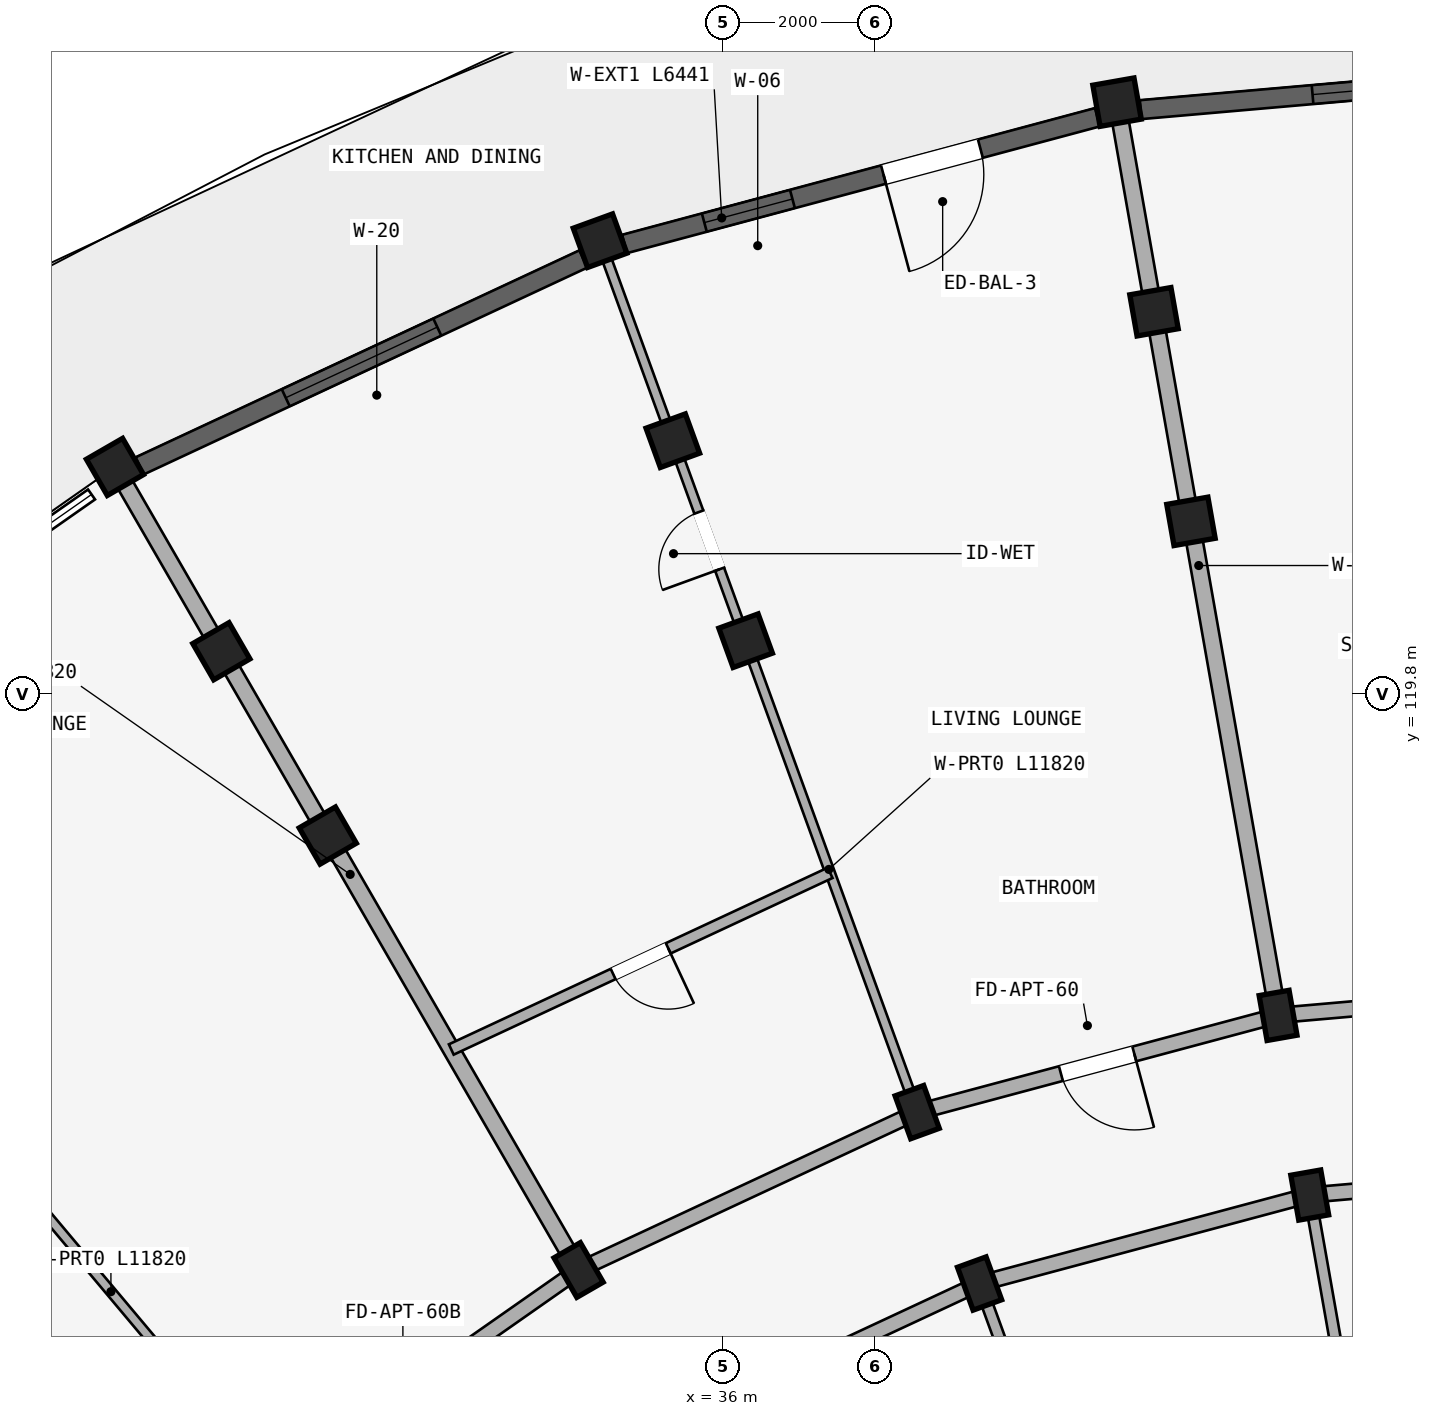
"""IFC4 building model, lengths in metres.
Left out: names, types, materials, properties, quantities, classifications, styles, units other than length and angle.
Written with IfcOpenShell. Run it as: python <this file> out.ifc"""

import sys

from ifc_helpers import new_model, si_unit, direction, frame, frame_2d, origin, origin_2d, place, context, subcontext, project, spatial, rectangle, extrude, element, fill, save


model = new_model("IFC4")
c1 = context("Model", 3, precision=1e-05, world=origin(), true_north=direction((0.0, 1.0)))
c2 = subcontext(c1, "Body", "Model", "MODEL_VIEW")
j1 = project(units=[si_unit("LENGTHUNIT", "METRE"), si_unit("PLANEANGLEUNIT", "RADIAN")], contexts=[c1])
p1 = place(None, origin())
s1 = spatial("IfcSite", under=j1, at=p1, CompositionType="ELEMENT")
p2 = place(p1, origin())
s2 = spatial("IfcBuilding", under=s1, at=p2, CompositionType="ELEMENT")
p3 = place(p2, frame((0.0, 0.0, 43.35)))
s3 = spatial("IfcBuildingStorey", under=s2, at=p3, CompositionType="ELEMENT", Elevation=43.35)
for number, where, z_axis, x_axis in (
    (1, (43.72, 113.208, 0.0), (0.0, 0.0, 1.0), (0.985, 0.174, 0.0)),
    (2, (43.303, 115.572, 0.0), (0.0, 0.0, 1.0), (0.985, 0.174, 0.0)),
):
    element("IfcColumn", number, at=place(p3, frame(where, z_axis=z_axis, x_axis=x_axis)), inside=s3, PredefinedType="COLUMN", context=c2, shape_type="SweptSolid", body=[
        extrude(rectangle(XDim=0.4, YDim=0.6, at=origin_2d()), origin(), (0.0, 0.0, 1.0), 2.93),
    ])
for number, where, z_axis, x_axis in (
    (3, (42.157, 122.071, 0.0), (0.0, 0.0, 1.0), (0.985, 0.174, 0.0)),
    (4, (41.671, 124.829, 0.0), (0.0, 0.0, 1.0), (0.985, 0.174, 0.0)),
):
    element("IfcColumn", number, at=place(p3, frame(where, z_axis=z_axis, x_axis=x_axis)), inside=s3, PredefinedType="COLUMN", context=c2, shape_type="SweptSolid", body=[
        extrude(rectangle(XDim=0.55, YDim=0.55, at=origin_2d()), origin(), (0.0, 0.0, 1.0), 2.93),
    ])
p4 = place(p3, frame((41.185, 127.586, 0.0), z_axis=(0.0, 0.0, 1.0), x_axis=(0.984807753012, 0.173648177667, 0.0)))
e5 = element("IfcColumn", 5, at=p4, inside=s3, PredefinedType="COLUMN", context=c2, shape_type="SweptSolid", body=[
    extrude(rectangle(XDim=0.55, YDim=0.55, at=origin_2d()), origin(), (0.0, 0.0, 1.0), 2.97),
])
for number, where, z_axis, x_axis in (
    (6, (39.376, 112.044, 0.0), (0.0, 0.0, 1.0), (0.94, 0.342, 0.0)),
    (7, (38.555, 114.299, 0.0), (0.0, 0.0, 1.0), (0.94, 0.342, 0.0)),
):
    element("IfcColumn", number, at=place(p3, frame(where, z_axis=z_axis, x_axis=x_axis)), inside=s3, PredefinedType="COLUMN", context=c2, shape_type="SweptSolid", body=[
        extrude(rectangle(XDim=0.4, YDim=0.6, at=origin_2d()), origin(), (0.0, 0.0, 1.0), 2.93),
    ])
for number, where, z_axis, x_axis in (
    (8, (36.298, 120.501, 0.0), (0.0, 0.0, 1.0), (0.94, 0.342, 0.0)),
    (9, (35.34, 123.132, 0.0), (0.0, 0.0, 1.0), (0.94, 0.342, 0.0)),
):
    element("IfcColumn", number, at=place(p3, frame(where, z_axis=z_axis, x_axis=x_axis)), inside=s3, PredefinedType="COLUMN", context=c2, shape_type="SweptSolid", body=[
        extrude(rectangle(XDim=0.55, YDim=0.55, at=origin_2d()), origin(), (0.0, 0.0, 1.0), 2.93),
    ])
p5 = place(p3, frame((34.382, 125.764, 0.0), z_axis=(0.0, 0.0, 1.0), x_axis=(0.939692620786, 0.342020143326, 0.0)))
e10 = element("IfcColumn", 10, at=p5, inside=s3, PredefinedType="COLUMN", context=c2, shape_type="SweptSolid", body=[
    extrude(rectangle(XDim=0.55, YDim=0.55, at=origin_2d()), origin(), (0.0, 0.0, 1.0), 2.97),
])
p6 = place(p3, frame((34.1, 112.222, 0.0), z_axis=(0.0, 0.0, 1.0), x_axis=(0.866025403784, 0.5, 0.0)))
e11 = element("IfcColumn", 11, at=p6, inside=s3, PredefinedType="COLUMN", context=c2, shape_type="SweptSolid", body=[
    extrude(rectangle(XDim=0.4, YDim=0.6, at=origin_2d()), origin(), (0.0, 0.0, 1.0), 2.93),
])
for number, where, z_axis, x_axis in (
    (12, (30.8, 117.938, 0.0), (0.0, 0.0, 1.0), (0.866, 0.5, 0.0)),
    (13, (29.4, 120.363, 0.0), (0.0, 0.0, 1.0), (0.866, 0.5, 0.0)),
):
    element("IfcColumn", number, at=place(p3, frame(where, z_axis=z_axis, x_axis=x_axis)), inside=s3, PredefinedType="COLUMN", context=c2, shape_type="SweptSolid", body=[
        extrude(rectangle(XDim=0.55, YDim=0.55, at=origin_2d()), origin(), (0.0, 0.0, 1.0), 2.93),
    ])
p7 = place(p3, frame((28.0, 122.787, 0.0), z_axis=(0.0, 0.0, 1.0), x_axis=(0.866025403784, 0.5, 0.0)))
e14 = element("IfcColumn", 14, at=p7, inside=s3, PredefinedType="COLUMN", context=c2, shape_type="SweptSolid", body=[
    extrude(rectangle(XDim=0.55, YDim=0.55, at=origin_2d()), origin(), (0.0, 0.0, 1.0), 2.97),
])
p8 = place(p3, frame((48.2, 113.6, 0.0), z_axis=(0.0, 0.0, 1.0), x_axis=(-0.996191949488, -0.087187153726, 0.0)))
e15 = element("IfcWall", 15, at=p8, inside=s3, PredefinedType="STANDARD", context=c2, shape_type="SweptSolid", body=[
    extrude(rectangle(XDim=4.497, YDim=0.2, at=frame_2d((2.249, 0.0))), origin(), (0.0, 0.0, 1.0), 2.372),
])
p9 = place(p8, frame((1.729, 0.0, 0.0)))
e16 = element("IfcOpeningElement", 16, at=p9, cuts=e15, PredefinedType="OPENING", context=c2, shape_type="SweptSolid", body=[
    extrude(rectangle(XDim=1.04, YDim=2.15, at=frame_2d((0.52, 1.075))), frame((0.0, 0.11, 0.0), z_axis=(0.0, -1.0, 0.0), x_axis=(1.0, 0.0, 0.0)), (0.0, 0.0, 1.0), 0.22),
])
p10 = place(p3, frame((48.2, 116.0, 0.0), z_axis=(0.0, 0.0, 1.0), x_axis=(-0.996193663584, -0.087167566415, 0.0)))
e17 = element("IfcWall", 17, at=p10, inside=s3, PredefinedType="STANDARD", context=c2, shape_type="SweptSolid", body=[
    extrude(rectangle(XDim=4.916, YDim=0.2, at=frame_2d((2.458, 0.0))), origin(), (0.0, 0.0, 1.0), 2.372),
])
p11 = place(p10, frame((1.888, 0.0, 0.0)))
e18 = element("IfcOpeningElement", 18, at=p11, cuts=e17, PredefinedType="OPENING", context=c2, shape_type="SweptSolid", body=[
    extrude(rectangle(XDim=1.14, YDim=2.15, at=frame_2d((0.57, 1.075))), frame((0.0, 0.11, 0.0), z_axis=(0.0, -1.0, 0.0), x_axis=(1.0, 0.0, 0.0)), (0.0, 0.0, 1.0), 0.22),
])
p12 = place(p3, frame((43.72, 113.208, 0.0), z_axis=(0.0, 0.0, 1.0), x_axis=(-0.965934240054, -0.258787642463, 0.0)))
e19 = element("IfcWall", 19, at=p12, inside=s3, PredefinedType="STANDARD", context=c2, shape_type="SweptSolid", body=[
    extrude(rectangle(XDim=4.497, YDim=0.2, at=frame_2d((2.249, 0.0))), origin(), (0.0, 0.0, 1.0), 2.372),
])
p13 = place(p3, frame((43.303, 115.572, 0.0), z_axis=(0.0, 0.0, 1.0), x_axis=(-0.965930095386, -0.258803112091, 0.0)))
e20 = element("IfcWall", 20, at=p13, inside=s3, PredefinedType="STANDARD", context=c2, shape_type="SweptSolid", body=[
    extrude(rectangle(XDim=4.916, YDim=0.2, at=frame_2d((2.458, 0.0))), origin(), (0.0, 0.0, 1.0), 2.372),
])
p14 = place(p13, frame((1.958, 0.0, 0.0)))
e21 = element("IfcOpeningElement", 21, at=p14, cuts=e20, PredefinedType="OPENING", context=c2, shape_type="SweptSolid", body=[
    extrude(rectangle(XDim=1.0, YDim=2.15, at=frame_2d((0.5, 1.075))), frame((0.0, 0.11, 0.0), z_axis=(0.0, -1.0, 0.0), x_axis=(1.0, 0.0, 0.0)), (0.0, 0.0, 1.0), 0.22),
])
p15 = place(p3, frame((39.376, 112.044, 0.0), z_axis=(0.0, 0.0, 1.0), x_axis=(-0.906307919131, -0.422617978463, 0.0)))
e22 = element("IfcWall", 22, at=p15, inside=s3, PredefinedType="STANDARD", context=c2, shape_type="SweptSolid", body=[
    extrude(rectangle(XDim=4.497, YDim=0.2, at=frame_2d((2.249, 0.0))), origin(), (0.0, 0.0, 1.0), 2.372),
])
p16 = place(p3, frame((38.555, 114.299, 0.0), z_axis=(0.0, 0.0, 1.0), x_axis=(-0.906302381024, -0.422629854778, 0.0)))
e23 = element("IfcWall", 23, at=p16, inside=s3, PredefinedType="STANDARD", context=c2, shape_type="SweptSolid", body=[
    extrude(rectangle(XDim=4.915, YDim=0.2, at=frame_2d((2.458, 0.0))), origin(), (0.0, 0.0, 1.0), 2.372),
])
p17 = place(p3, frame((34.1, 112.222, 0.0), z_axis=(0.0, 0.0, 1.0), x_axis=(-0.819140911474, -0.573592335331, 0.0)))
e24 = element("IfcWall", 24, at=p17, inside=s3, PredefinedType="STANDARD", context=c2, shape_type="SweptSolid", body=[
    extrude(rectangle(XDim=4.916, YDim=0.2, at=frame_2d((2.458, 0.0))), origin(), (0.0, 0.0, 1.0), 2.372),
])
p18 = place(p17, frame((1.938, 0.0, 0.0)))
e25 = element("IfcOpeningElement", 25, at=p18, cuts=e24, PredefinedType="OPENING", context=c2, shape_type="SweptSolid", body=[
    extrude(rectangle(XDim=1.04, YDim=2.15, at=frame_2d((0.52, 1.075))), frame((0.0, 0.11, 0.0), z_axis=(0.0, -1.0, 0.0), x_axis=(1.0, 0.0, 0.0)), (0.0, 0.0, 1.0), 0.22),
])
p19 = place(p3, frame((44.901, 106.511, 0.0), z_axis=(0.0, 0.0, 1.0), x_axis=(-0.173647089161, 0.984807944945, 0.0)))
e26 = element("IfcWall", 26, at=p19, inside=s3, PredefinedType="PARTITIONING", context=c2, shape_type="SweptSolid", body=[
    extrude(rectangle(XDim=6.75, YDim=0.15, at=frame_2d((3.375, 0.0))), origin(), (0.0, 0.0, 1.0), 2.372),
])
p20 = place(p19, frame((3.262, 0.0, 0.0)))
e27 = element("IfcOpeningElement", 27, at=p20, cuts=e26, PredefinedType="OPENING", context=c2, shape_type="SweptSolid", body=[
    extrude(rectangle(XDim=0.9, YDim=2.1, at=frame_2d((0.45, 1.05))), frame((0.0, 0.085, 0.0), z_axis=(0.0, -1.0, 0.0), x_axis=(1.0, 0.0, 0.0)), (0.0, 0.0, 1.0), 0.17),
])
p21 = place(p3, frame((43.286, 115.67, 0.0), z_axis=(0.0, 0.0, 1.0), x_axis=(-0.173646292378, 0.984808085438, 0.0)))
e28 = element("IfcWall", 28, at=p21, inside=s3, PredefinedType="STANDARD", context=c2, shape_type="SweptSolid", body=[
    extrude(rectangle(XDim=11.82, YDim=0.22, at=frame_2d((5.91, 0.0))), origin(), (0.0, 0.0, 1.0), 2.372),
])
p22 = place(p3, frame((41.702, 105.654, 0.0), z_axis=(0.0, 0.0, 1.0), x_axis=(-0.342010221662, 0.939696231917, 0.0)))
e29 = element("IfcWall", 29, at=p22, inside=s3, PredefinedType="PARTITIONING", context=c2, shape_type="SweptSolid", body=[
    extrude(rectangle(XDim=6.75, YDim=0.15, at=frame_2d((3.375, 0.0))), origin(), (0.0, 0.0, 1.0), 2.372),
])
p23 = place(p22, frame((3.242, 0.0, 0.0)))
e30 = element("IfcOpeningElement", 30, at=p23, cuts=e29, PredefinedType="OPENING", context=c2, shape_type="SweptSolid", body=[
    extrude(rectangle(XDim=0.94, YDim=2.1, at=frame_2d((0.47, 1.05))), frame((0.0, 0.085, 0.0), z_axis=(0.0, -1.0, 0.0), x_axis=(1.0, 0.0, 0.0)), (0.0, 0.0, 1.0), 0.17),
])
p24 = place(p3, frame((38.521, 114.393, 0.0), z_axis=(0.0, 0.0, 1.0), x_axis=(-0.342005081534, 0.939698102693, 0.0)))
e31 = element("IfcWall", 31, at=p24, inside=s3, PredefinedType="PARTITIONING", context=c2, shape_type="SweptSolid", body=[
    extrude(rectangle(XDim=11.82, YDim=0.125, at=frame_2d((5.91, 0.0))), origin(), (0.0, 0.0, 1.0), 2.372),
])
p25 = place(p24, frame((7.5, 0.0, 0.0)))
e32 = element("IfcOpeningElement", 32, at=p25, cuts=e31, PredefinedType="OPENING", context=c2, shape_type="SweptSolid", body=[
    extrude(rectangle(XDim=0.8, YDim=2.1, at=frame_2d((0.4, 1.05))), frame((0.0, 0.073, 0.0), z_axis=(0.0, -1.0, 0.0), x_axis=(1.0, 0.0, 0.0)), (0.0, 0.0, 1.0), 0.145),
])
p26 = place(p3, frame((34.05, 112.309, 0.0), z_axis=(0.0, 0.0, 1.0), x_axis=(-0.500013290014, 0.866017730655, 0.0)))
e33 = element("IfcWall", 33, at=p26, inside=s3, PredefinedType="STANDARD", context=c2, shape_type="SweptSolid", body=[
    extrude(rectangle(XDim=11.82, YDim=0.22, at=frame_2d((5.91, 0.0))), origin(), (0.0, 0.0, 1.0), 2.372),
])
p27 = place(p3, frame((30.009, 109.479, 0.0), z_axis=(0.0, 0.0, 1.0), x_axis=(-0.642781220531, 0.766049804211, 0.0)))
e34 = element("IfcWall", 34, at=p27, inside=s3, PredefinedType="PARTITIONING", context=c2, shape_type="SweptSolid", body=[
    extrude(rectangle(XDim=11.82, YDim=0.125, at=frame_2d((5.91, 0.0))), origin(), (0.0, 0.0, 1.0), 2.372),
])
p28 = place(p27, frame((7.5, 0.0, 0.0)))
e35 = element("IfcOpeningElement", 35, at=p28, cuts=e34, PredefinedType="OPENING", context=c2, shape_type="SweptSolid", body=[
    extrude(rectangle(XDim=0.8, YDim=2.1, at=frame_2d((0.4, 1.05))), frame((0.0, 0.073, 0.0), z_axis=(0.0, -1.0, 0.0), x_axis=(1.0, 0.0, 0.0)), (0.0, 0.0, 1.0), 0.145),
])
p29 = place(p3, frame((37.409, 117.447, 0.0), z_axis=(0.0, 0.0, 1.0), x_axis=(-0.906302189986, -0.422630264446, 0.0)))
e36 = element("IfcWall", 36, at=p29, inside=s3, PredefinedType="PLUMBINGWALL", context=c2, shape_type="SweptSolid", body=[
    extrude(rectangle(XDim=5.5, YDim=0.15, at=frame_2d((2.75, 0.0))), origin(), (0.0, 0.0, 1.0), 2.372),
])
p30 = place(p29, frame((2.35, 0.0, 0.0)))
e37 = element("IfcOpeningElement", 37, at=p30, cuts=e36, PredefinedType="OPENING", context=c2, shape_type="SweptSolid", body=[
    extrude(rectangle(XDim=0.8, YDim=2.1, at=frame_2d((0.4, 1.05))), frame((0.0, 0.085, 0.0), z_axis=(0.0, -1.0, 0.0), x_axis=(1.0, 0.0, 0.0)), (0.0, 0.0, 1.0), 0.17),
])
p31 = place(p3, frame((47.911, 128.049, 0.0), z_axis=(0.0, 0.0, 1.0), x_axis=(-0.996192647716, -0.087179175472, 0.0)))
e38 = element("IfcWall", 38, at=p31, inside=s3, PredefinedType="STANDARD", context=c2, shape_type="SweptSolid", body=[
    extrude(rectangle(XDim=6.441, YDim=0.25, at=frame_2d((3.22, 0.0))), origin(), (0.0, 0.0, 1.0), 2.412),
])
p32 = place(p31, frame((2.271, 0.0, 0.462)))
e39 = element("IfcOpeningElement", 39, at=p32, cuts=e38, PredefinedType="OPENING", context=c2, shape_type="SweptSolid", body=[
    extrude(rectangle(XDim=1.9, YDim=1.75, at=frame_2d((0.95, 0.875))), frame((0.0, 0.135, 0.0), z_axis=(0.0, -1.0, 0.0), x_axis=(1.0, 0.0, 0.0)), (0.0, 0.0, 1.0), 0.27),
])
p33 = place(p3, frame((40.927, 127.388, 0.0), z_axis=(0.0, 0.0, 1.0), x_axis=(-0.965929779688, -0.258804290367, 0.0)))
e40 = element("IfcWall", 40, at=p33, inside=s3, PredefinedType="STANDARD", context=c2, shape_type="SweptSolid", body=[
    extrude(rectangle(XDim=6.441, YDim=0.25, at=frame_2d((3.221, 0.0))), origin(), (0.0, 0.0, 1.0), 2.412),
])
p34 = place(p33, frame((4.155, 0.0, 0.562)))
e41 = element("IfcOpeningElement", 41, at=p34, cuts=e40, PredefinedType="OPENING", context=c2, shape_type="SweptSolid", body=[
    extrude(rectangle(XDim=1.2, YDim=1.5, at=frame_2d((0.6, 0.75))), frame((0.0, 0.135, 0.0), z_axis=(0.0, -1.0, 0.0), x_axis=(1.0, 0.0, 0.0)), (0.0, 0.0, 1.0), 0.27),
])
p35 = place(p33, frame((1.594, 0.0, 0.0)))
e42 = element("IfcOpeningElement", 42, at=p35, cuts=e40, PredefinedType="OPENING", context=c2, shape_type="SweptSolid", body=[
    extrude(rectangle(XDim=1.32, YDim=2.15, at=frame_2d((0.66, 1.075))), frame((0.0, 0.135, 0.0), z_axis=(0.0, -1.0, 0.0), x_axis=(1.0, 0.0, 0.0)), (0.0, 0.0, 1.0), 0.27),
])
p36 = place(p3, frame((34.163, 125.523, 0.0), z_axis=(0.0, 0.0, 1.0), x_axis=(-0.906320597547, -0.422590788426, 0.0)))
e43 = element("IfcWall", 43, at=p36, inside=s3, PredefinedType="STANDARD", context=c2, shape_type="SweptSolid", body=[
    extrude(rectangle(XDim=6.441, YDim=0.25, at=frame_2d((3.22, 0.0))), origin(), (0.0, 0.0, 1.0), 2.412),
])
p37 = place(p36, frame((2.121, 0.0, 0.312)))
e44 = element("IfcOpeningElement", 44, at=p37, cuts=e43, PredefinedType="OPENING", context=c2, shape_type="SweptSolid", body=[
    extrude(rectangle(XDim=2.2, YDim=1.9, at=frame_2d((1.1, 0.95))), frame((0.0, 0.135, 0.0), z_axis=(0.0, -1.0, 0.0), x_axis=(1.0, 0.0, 0.0)), (0.0, 0.0, 1.0), 0.27),
])
p38 = place(p32, origin())
e45 = element("IfcWindow", 45, at=p38, inside=s3, PartitioningType="DOUBLE_PANEL_VERTICAL", PredefinedType="WINDOW", context=c2, shape_type="SweptSolid", body=[
    extrude(rectangle(XDim=1.9, YDim=1.75, at=frame_2d((0.95, 0.875))), frame((0.0, 0.03, 0.0), z_axis=(0.0, -1.0, 0.0), x_axis=(1.0, 0.0, 0.0)), (0.0, 0.0, 1.0), 0.06),
])
fill(e39, e45)
p39 = place(p34, origin())
e46 = element("IfcWindow", 46, at=p39, inside=s3, PartitioningType="SINGLE_PANEL", PredefinedType="WINDOW", context=c2, shape_type="SweptSolid", body=[
    extrude(rectangle(XDim=1.2, YDim=1.5, at=frame_2d((0.6, 0.75))), frame((0.0, 0.03, 0.0), z_axis=(0.0, -1.0, 0.0), x_axis=(1.0, 0.0, 0.0)), (0.0, 0.0, 1.0), 0.06),
])
fill(e41, e46)
p40 = place(p37, origin())
e47 = element("IfcWindow", 47, at=p40, inside=s3, PartitioningType="TRIPLE_PANEL_VERTICAL", PredefinedType="WINDOW", context=c2, shape_type="SweptSolid", body=[
    extrude(rectangle(XDim=2.2, YDim=1.9, at=frame_2d((1.1, 0.95))), frame((0.0, 0.03, 0.0), z_axis=(0.0, -1.0, 0.0), x_axis=(1.0, 0.0, 0.0)), (0.0, 0.0, 1.0), 0.06),
])
fill(e44, e47)
p41 = place(p25, frame((0.8, 0.0, 0.0), z_axis=(0.0, 0.0, 1.0), x_axis=(-1.0, 0.0, 0.0)))
e48 = element("IfcDoor", 48, at=p41, inside=s3, OperationType="SINGLE_SWING_RIGHT", PredefinedType="DOOR", context=c2, shape_type="SweptSolid", body=[
    extrude(rectangle(XDim=0.8, YDim=2.1, at=frame_2d((0.4, 1.05))), frame((0.0, 0.025, 0.0), z_axis=(0.0, -1.0, 0.0), x_axis=(1.0, 0.0, 0.0)), (0.0, 0.0, 1.0), 0.05),
])
fill(e32, e48)
p42 = place(p14, origin())
e49 = element("IfcDoor", 49, at=p42, inside=s3, OperationType="SINGLE_SWING_LEFT", PredefinedType="DOOR", context=c2, shape_type="SweptSolid", body=[
    extrude(rectangle(XDim=1.0, YDim=2.15, at=frame_2d((0.5, 1.075))), frame((0.0, 0.025, 0.0), z_axis=(0.0, -1.0, 0.0), x_axis=(1.0, 0.0, 0.0)), (0.0, 0.0, 1.0), 0.05),
])
fill(e21, e49)
p43 = place(p30, frame((0.8, 0.0, 0.0), z_axis=(0.0, 0.0, 1.0), x_axis=(-1.0, 0.0, 0.0)))
e50 = element("IfcDoor", 50, at=p43, inside=s3, OperationType="SINGLE_SWING_RIGHT", PredefinedType="DOOR", context=c2, shape_type="SweptSolid", body=[
    extrude(rectangle(XDim=0.8, YDim=2.1, at=frame_2d((0.4, 1.05))), frame((0.0, 0.025, 0.0), z_axis=(0.0, -1.0, 0.0), x_axis=(1.0, 0.0, 0.0)), (0.0, 0.0, 1.0), 0.05),
])
fill(e37, e50)
p44 = place(p35, frame((1.32, 0.0, 0.0), z_axis=(0.0, 0.0, 1.0), x_axis=(-1.0, 0.0, 0.0)))
e51 = element("IfcDoor", 51, at=p44, inside=s3, OperationType="SINGLE_SWING_LEFT", PredefinedType="DOOR", context=c2, shape_type="SweptSolid", body=[
    extrude(rectangle(XDim=1.32, YDim=2.15, at=frame_2d((0.66, 1.075))), frame((0.0, 0.025, 0.0), z_axis=(0.0, -1.0, 0.0), x_axis=(1.0, 0.0, 0.0)), (0.0, 0.0, 1.0), 0.05),
])
fill(e42, e51)
save(model, sys.argv[1])
